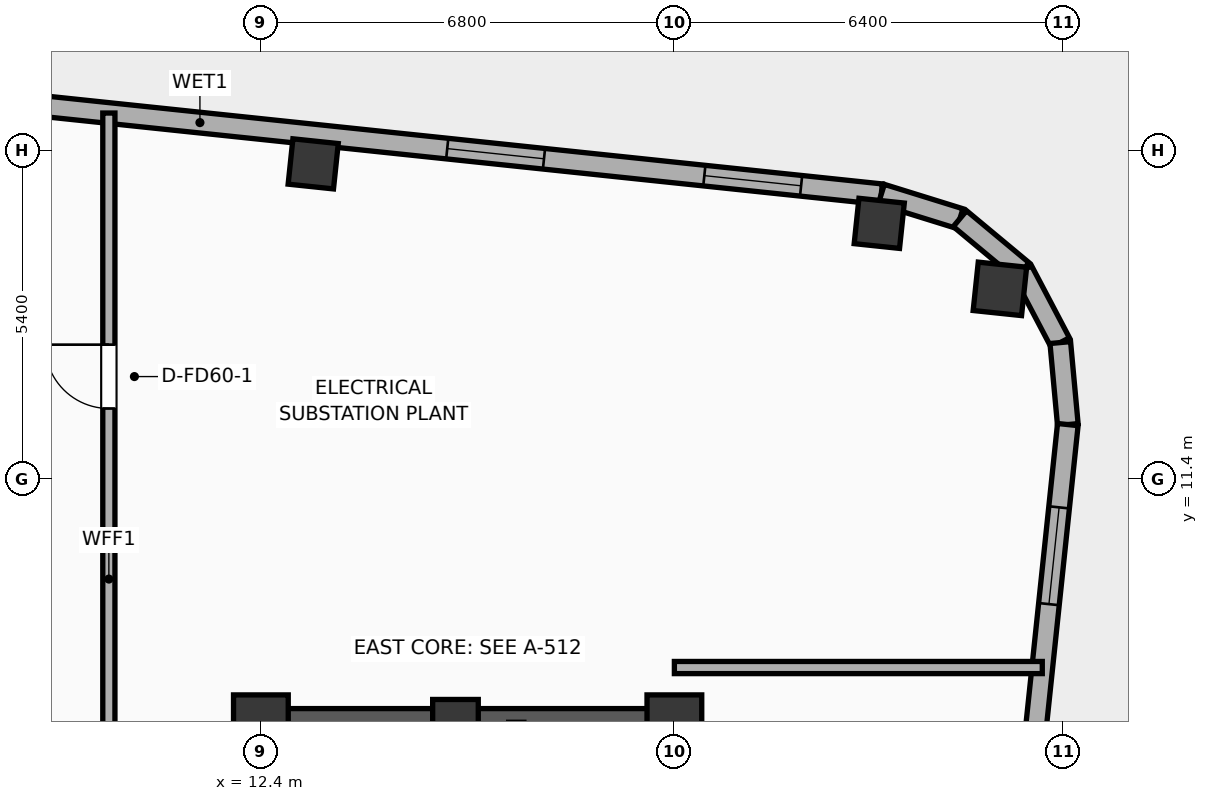
"""IFC4 building model, lengths in metres.
Left out: names, types, materials, properties, quantities, classifications, styles, units other than length and angle.
Written with IfcOpenShell. Run it as: python <this file> out.ifc"""

import sys

from ifc_helpers import new_model, si_unit, direction, frame, frame_2d, origin, origin_2d, place, context, subcontext, project, spatial, rectangle, hollow_rectangle, hollow_circle, extrude, element, fill, save


model = new_model("IFC4")
c1 = context("Model", 3, precision=1e-05, world=origin(), true_north=direction((0.0, 1.0)))
c2 = subcontext(c1, "Body", "Model", "MODEL_VIEW")
j1 = project(units=[si_unit("LENGTHUNIT", "METRE"), si_unit("PLANEANGLEUNIT", "RADIAN")], contexts=[c1])
p1 = place(None, origin())
s1 = spatial("IfcSite", under=j1, at=p1, CompositionType="ELEMENT")
p2 = place(p1, origin())
s2 = spatial("IfcBuilding", under=s1, at=p2, CompositionType="ELEMENT")
p3 = place(p2, frame((0.0, 0.0, 254.8)))
s3 = spatial("IfcBuildingStorey", under=s2, at=p3, CompositionType="ELEMENT", Elevation=254.8)
p4 = place(p3, frame((12.4, 7.4, 0.0), z_axis=(0.0, 0.0, 1.0), x_axis=(1.0, 0.0, 0.0)))
e1 = element("IfcColumn", 1, at=p4, inside=s3, PredefinedType="COLUMN", context=c2, shape_type="SweptSolid", body=[
    extrude(rectangle(XDim=0.9, YDim=0.9, at=origin_2d()), origin(), (0.0, 0.0, 1.0), 5.2),
])
p5 = place(p3, frame((15.6, 7.4, 0.0), z_axis=(0.0, 0.0, 1.0), x_axis=(1.0, 0.0, 0.0)))
e2 = element("IfcColumn", 2, at=p5, inside=s3, PredefinedType="COLUMN", context=c2, shape_type="SweptSolid", body=[
    extrude(rectangle(XDim=0.75, YDim=0.75, at=origin_2d()), origin(), (0.0, 0.0, 1.0), 5.2),
])
p6 = place(p3, frame((19.2, 7.4, 0.0), z_axis=(0.0, 0.0, 1.0), x_axis=(1.0, 0.0, 0.0)))
e3 = element("IfcColumn", 3, at=p6, inside=s3, PredefinedType="COLUMN", context=c2, shape_type="SweptSolid", body=[
    extrude(rectangle(XDim=0.9, YDim=0.9, at=origin_2d()), origin(), (0.0, 0.0, 1.0), 5.2),
])
p7 = place(p3, frame((12.175, 7.4, 0.0), z_axis=(0.0, 0.0, 1.0), x_axis=(1.0, 0.0, 0.0)))
e4 = element("IfcWall", 4, at=p7, inside=s3, PredefinedType="SHEAR", context=c2, shape_type="SweptSolid", body=[
    extrude(rectangle(XDim=7.25, YDim=0.45, at=frame_2d((3.625, 0.0))), origin(), (0.0, 0.0, 1.0), 4.8),
])
p8 = place(p3, frame((24.553, 14.527, -0.4), z_axis=(0.0, 0.0, 1.0), x_axis=(0.994521895368, -0.104528463268, 0.0)))
e5 = element("IfcColumn", 5, at=p8, inside=s3, PredefinedType="COLUMN", context=c2, shape_type="SweptSolid", body=[
    extrude(hollow_circle(Radius=0.4, WallThickness=0.028, at=origin_2d()), origin(), (0.0, 0.0, 1.0), 5.6),
])
for number, where, z_axis, x_axis in (
    (6, (22.569, 15.604, -0.4), (0.0, 0.0, 1.0), (0.995, -0.105, 0.0)),
    (7, (13.26, 16.583, -0.4), (0.0, 0.0, 1.0), (0.995, -0.105, 0.0)),
):
    element("IfcColumn", number, at=place(p3, frame(where, z_axis=z_axis, x_axis=x_axis)), inside=s3, PredefinedType="COLUMN", context=c2, shape_type="SweptSolid", body=[
        extrude(hollow_rectangle(XDim=0.75, YDim=0.75, WallThickness=0.025, at=origin_2d()), origin(), (0.0, 0.0, 1.0), 5.6),
    ])
p9 = place(p3, frame((-23.908, 20.972, 0.0), z_axis=(0.0, 0.0, 1.0), x_axis=(0.994521888554, -0.104528528102, 0.0)))
e8 = element("IfcWall", 8, at=p9, inside=s3, PredefinedType="ELEMENTEDWALL", context=c2, shape_type="SweptSolid", body=[
    extrude(rectangle(XDim=46.766, YDim=0.34, at=frame_2d((23.383, 0.0))), origin(), (0.0, 0.0, 1.0), 3.69),
])
p10 = place(p9, frame((1.326, 0.0, 0.75)))
e9 = element("IfcOpeningElement", 9, at=p10, cuts=e8, PredefinedType="OPENING", context=c2, shape_type="SweptSolid", body=[
    extrude(rectangle(XDim=1.6, YDim=1.4, at=frame_2d((0.8, 0.7))), frame((0.0, 0.18, 0.0), z_axis=(0.0, -1.0, 0.0), x_axis=(1.0, 0.0, 0.0)), (0.0, 0.0, 1.0), 0.36),
])
p11 = place(p9, frame((5.577, 0.0, 0.75)))
e10 = element("IfcOpeningElement", 10, at=p11, cuts=e8, PredefinedType="OPENING", context=c2, shape_type="SweptSolid", body=[
    extrude(rectangle(XDim=1.6, YDim=1.4, at=frame_2d((0.8, 0.7))), frame((0.0, 0.18, 0.0), z_axis=(0.0, -1.0, 0.0), x_axis=(1.0, 0.0, 0.0)), (0.0, 0.0, 1.0), 0.36),
])
p12 = place(p9, frame((22.583, 0.0, 0.0)))
e11 = element("IfcOpeningElement", 11, at=p12, cuts=e8, PredefinedType="OPENING", context=c2, shape_type="SweptSolid", body=[
    extrude(rectangle(XDim=1.5, YDim=2.05, at=frame_2d((0.75, 1.025))), frame((0.0, 0.18, 0.0), z_axis=(0.0, -1.0, 0.0), x_axis=(1.0, 0.0, 0.0)), (0.0, 0.0, 1.0), 0.36),
])
p13 = place(p9, frame((31.086, 0.0, 0.75)))
e12 = element("IfcOpeningElement", 12, at=p13, cuts=e8, PredefinedType="OPENING", context=c2, shape_type="SweptSolid", body=[
    extrude(rectangle(XDim=1.6, YDim=1.4, at=frame_2d((0.8, 0.7))), frame((0.0, 0.18, 0.0), z_axis=(0.0, -1.0, 0.0), x_axis=(1.0, 0.0, 0.0)), (0.0, 0.0, 1.0), 0.36),
])
p14 = place(p9, frame((39.589, 0.0, 0.75)))
e13 = element("IfcOpeningElement", 13, at=p14, cuts=e8, PredefinedType="OPENING", context=c2, shape_type="SweptSolid", body=[
    extrude(rectangle(XDim=1.6, YDim=1.4, at=frame_2d((0.8, 0.7))), frame((0.0, 0.18, 0.0), z_axis=(0.0, -1.0, 0.0), x_axis=(1.0, 0.0, 0.0)), (0.0, 0.0, 1.0), 0.36),
])
p15 = place(p9, frame((43.841, 0.0, 0.75)))
e14 = element("IfcOpeningElement", 14, at=p15, cuts=e8, PredefinedType="OPENING", context=c2, shape_type="SweptSolid", body=[
    extrude(rectangle(XDim=1.6, YDim=1.4, at=frame_2d((0.8, 0.7))), frame((0.0, 0.18, 0.0), z_axis=(0.0, -1.0, 0.0), x_axis=(1.0, 0.0, 0.0)), (0.0, 0.0, 1.0), 0.36),
])
p16 = place(p3, frame((22.603, 16.084, 0.0), z_axis=(0.0, 0.0, 1.0), x_axis=(0.955007802701, -0.296580674994, 0.0)))
e15 = element("IfcWall", 15, at=p16, inside=s3, PredefinedType="ELEMENTEDWALL", context=c2, shape_type="SweptSolid", body=[
    extrude(rectangle(XDim=1.354, YDim=0.34, at=frame_2d((0.677, 0.0))), origin(), (0.0, 0.0, 1.0), 3.69),
])
p17 = place(p3, frame((23.896, 15.682, 0.0), z_axis=(0.0, 0.0, 1.0), x_axis=(0.768789762863, -0.639501603217, 0.0)))
e16 = element("IfcWall", 16, at=p17, inside=s3, PredefinedType="ELEMENTEDWALL", context=c2, shape_type="SweptSolid", body=[
    extrude(rectangle(XDim=1.337, YDim=0.34, at=frame_2d((0.668, 0.0))), origin(), (0.0, 0.0, 1.0), 3.69),
])
p18 = place(p3, frame((24.924, 14.827, 0.0), z_axis=(0.0, 0.0, 1.0), x_axis=(0.46567116636, -0.884957832228, 0.0)))
e17 = element("IfcWall", 17, at=p18, inside=s3, PredefinedType="ELEMENTEDWALL", context=c2, shape_type="SweptSolid", body=[
    extrude(rectangle(XDim=1.337, YDim=0.34, at=frame_2d((0.668, 0.0))), origin(), (0.0, 0.0, 1.0), 4.8),
])
p19 = place(p3, frame((25.546, 13.644, 0.0), z_axis=(0.0, 0.0, 1.0), x_axis=(0.091592370975, -0.995796584438, 0.0)))
e18 = element("IfcWall", 18, at=p19, inside=s3, PredefinedType="ELEMENTEDWALL", context=c2, shape_type="SweptSolid", body=[
    extrude(rectangle(XDim=1.354, YDim=0.34, at=frame_2d((0.677, 0.0))), origin(), (0.0, 0.0, 1.0), 4.8),
])
p20 = place(p3, frame((25.67, 12.296, 0.0), z_axis=(0.0, 0.0, 1.0), x_axis=(-0.104533282919, -0.994521388791, 0.0)))
e19 = element("IfcWall", 19, at=p20, inside=s3, PredefinedType="ELEMENTEDWALL", context=c2, shape_type="SweptSolid", body=[
    extrude(rectangle(XDim=30.366, YDim=0.34, at=frame_2d((15.183, 0.0))), origin(), (0.0, 0.0, 1.0), 3.69),
])
p21 = place(p20, frame((1.369, 0.0, 0.75)))
e20 = element("IfcOpeningElement", 20, at=p21, cuts=e19, PredefinedType="OPENING", context=c2, shape_type="SweptSolid", body=[
    extrude(rectangle(XDim=1.6, YDim=1.4, at=frame_2d((0.8, 0.7))), frame((0.0, 0.18, 0.0), z_axis=(0.0, -1.0, 0.0), x_axis=(1.0, 0.0, 0.0)), (0.0, 0.0, 1.0), 0.36),
])
p22 = place(p20, frame((5.707, 0.0, 0.75)))
e21 = element("IfcOpeningElement", 21, at=p22, cuts=e19, PredefinedType="OPENING", context=c2, shape_type="SweptSolid", body=[
    extrude(rectangle(XDim=1.6, YDim=1.4, at=frame_2d((0.8, 0.7))), frame((0.0, 0.18, 0.0), z_axis=(0.0, -1.0, 0.0), x_axis=(1.0, 0.0, 0.0)), (0.0, 0.0, 1.0), 0.36),
])
p23 = place(p20, frame((14.383, 0.0, 0.75)))
e22 = element("IfcOpeningElement", 22, at=p23, cuts=e19, PredefinedType="OPENING", context=c2, shape_type="SweptSolid", body=[
    extrude(rectangle(XDim=1.6, YDim=1.4, at=frame_2d((0.8, 0.7))), frame((0.0, 0.18, 0.0), z_axis=(0.0, -1.0, 0.0), x_axis=(1.0, 0.0, 0.0)), (0.0, 0.0, 1.0), 0.36),
])
p24 = place(p20, frame((18.721, 0.0, 0.75)))
e23 = element("IfcOpeningElement", 23, at=p24, cuts=e19, PredefinedType="OPENING", context=c2, shape_type="SweptSolid", body=[
    extrude(rectangle(XDim=1.6, YDim=1.4, at=frame_2d((0.8, 0.7))), frame((0.0, 0.18, 0.0), z_axis=(0.0, -1.0, 0.0), x_axis=(1.0, 0.0, 0.0)), (0.0, 0.0, 1.0), 0.36),
])
p25 = place(p20, frame((23.059, 0.0, 0.75)))
e24 = element("IfcOpeningElement", 24, at=p25, cuts=e19, PredefinedType="OPENING", context=c2, shape_type="SweptSolid", body=[
    extrude(rectangle(XDim=1.6, YDim=1.4, at=frame_2d((0.8, 0.7))), frame((0.0, 0.18, 0.0), z_axis=(0.0, -1.0, 0.0), x_axis=(1.0, 0.0, 0.0)), (0.0, 0.0, 1.0), 0.36),
])
p26 = place(p20, frame((27.397, 0.0, 0.75)))
e25 = element("IfcOpeningElement", 25, at=p26, cuts=e19, PredefinedType="OPENING", context=c2, shape_type="SweptSolid", body=[
    extrude(rectangle(XDim=1.6, YDim=1.4, at=frame_2d((0.8, 0.7))), frame((0.0, 0.18, 0.0), z_axis=(0.0, -1.0, 0.0), x_axis=(1.0, 0.0, 0.0)), (0.0, 0.0, 1.0), 0.36),
])
p27 = place(p3, frame((19.2, 8.3, 0.0), z_axis=(0.0, 0.0, 1.0), x_axis=(1.0, 0.0, 0.0)))
e26 = element("IfcWall", 26, at=p27, inside=s3, PredefinedType="PARTITIONING", context=c2, shape_type="SweptSolid", body=[
    extrude(rectangle(XDim=6.05, YDim=0.2, at=frame_2d((3.025, 0.0))), origin(), (0.0, 0.0, 1.0), 4.8),
])
p28 = place(p3, frame((9.9, 7.1, 0.0), z_axis=(0.0, 0.0, 1.0), x_axis=(0.0, 1.0, 0.0)))
e27 = element("IfcWall", 27, at=p28, inside=s3, PredefinedType="PARTITIONING", context=c2, shape_type="SweptSolid", body=[
    extrude(rectangle(XDim=10.319, YDim=0.2, at=frame_2d((5.159, 0.0))), origin(), (0.0, 0.0, 1.0), 4.8),
])
p29 = place(p28, frame((5.46, 0.0, 0.0)))
e28 = element("IfcOpeningElement", 28, at=p29, cuts=e27, PredefinedType="OPENING", context=c2, shape_type="SweptSolid", body=[
    extrude(rectangle(XDim=1.05, YDim=2.05, at=frame_2d((0.525, 1.025))), frame((0.0, 0.11, 0.0), z_axis=(0.0, -1.0, 0.0), x_axis=(1.0, 0.0, 0.0)), (0.0, 0.0, 1.0), 0.22),
])
p30 = place(p14, origin())
e29 = element("IfcWindow", 29, at=p30, inside=s3, PartitioningType="SINGLE_PANEL", PredefinedType="WINDOW", context=c2, shape_type="SweptSolid", body=[
    extrude(rectangle(XDim=1.6, YDim=1.4, at=frame_2d((0.8, 0.7))), frame((0.0, 0.03, 0.0), z_axis=(0.0, -1.0, 0.0), x_axis=(1.0, 0.0, 0.0)), (0.0, 0.0, 1.0), 0.06),
])
fill(e13, e29)
p31 = place(p15, origin())
e30 = element("IfcWindow", 30, at=p31, inside=s3, PartitioningType="SINGLE_PANEL", PredefinedType="WINDOW", context=c2, shape_type="SweptSolid", body=[
    extrude(rectangle(XDim=1.6, YDim=1.4, at=frame_2d((0.8, 0.7))), frame((0.0, 0.03, 0.0), z_axis=(0.0, -1.0, 0.0), x_axis=(1.0, 0.0, 0.0)), (0.0, 0.0, 1.0), 0.06),
])
fill(e14, e30)
p32 = place(p21, origin())
e31 = element("IfcWindow", 31, at=p32, inside=s3, PartitioningType="SINGLE_PANEL", PredefinedType="WINDOW", context=c2, shape_type="SweptSolid", body=[
    extrude(rectangle(XDim=1.6, YDim=1.4, at=frame_2d((0.8, 0.7))), frame((0.0, 0.03, 0.0), z_axis=(0.0, -1.0, 0.0), x_axis=(1.0, 0.0, 0.0)), (0.0, 0.0, 1.0), 0.06),
])
fill(e20, e31)
p33 = place(p29, origin())
e32 = element("IfcDoor", 32, at=p33, inside=s3, OperationType="SINGLE_SWING_RIGHT", PredefinedType="DOOR", context=c2, shape_type="SweptSolid", body=[
    extrude(rectangle(XDim=1.05, YDim=2.05, at=frame_2d((0.525, 1.025))), frame((0.0, 0.025, 0.0), z_axis=(0.0, -1.0, 0.0), x_axis=(1.0, 0.0, 0.0)), (0.0, 0.0, 1.0), 0.05),
])
fill(e28, e32)
save(model, sys.argv[1])
